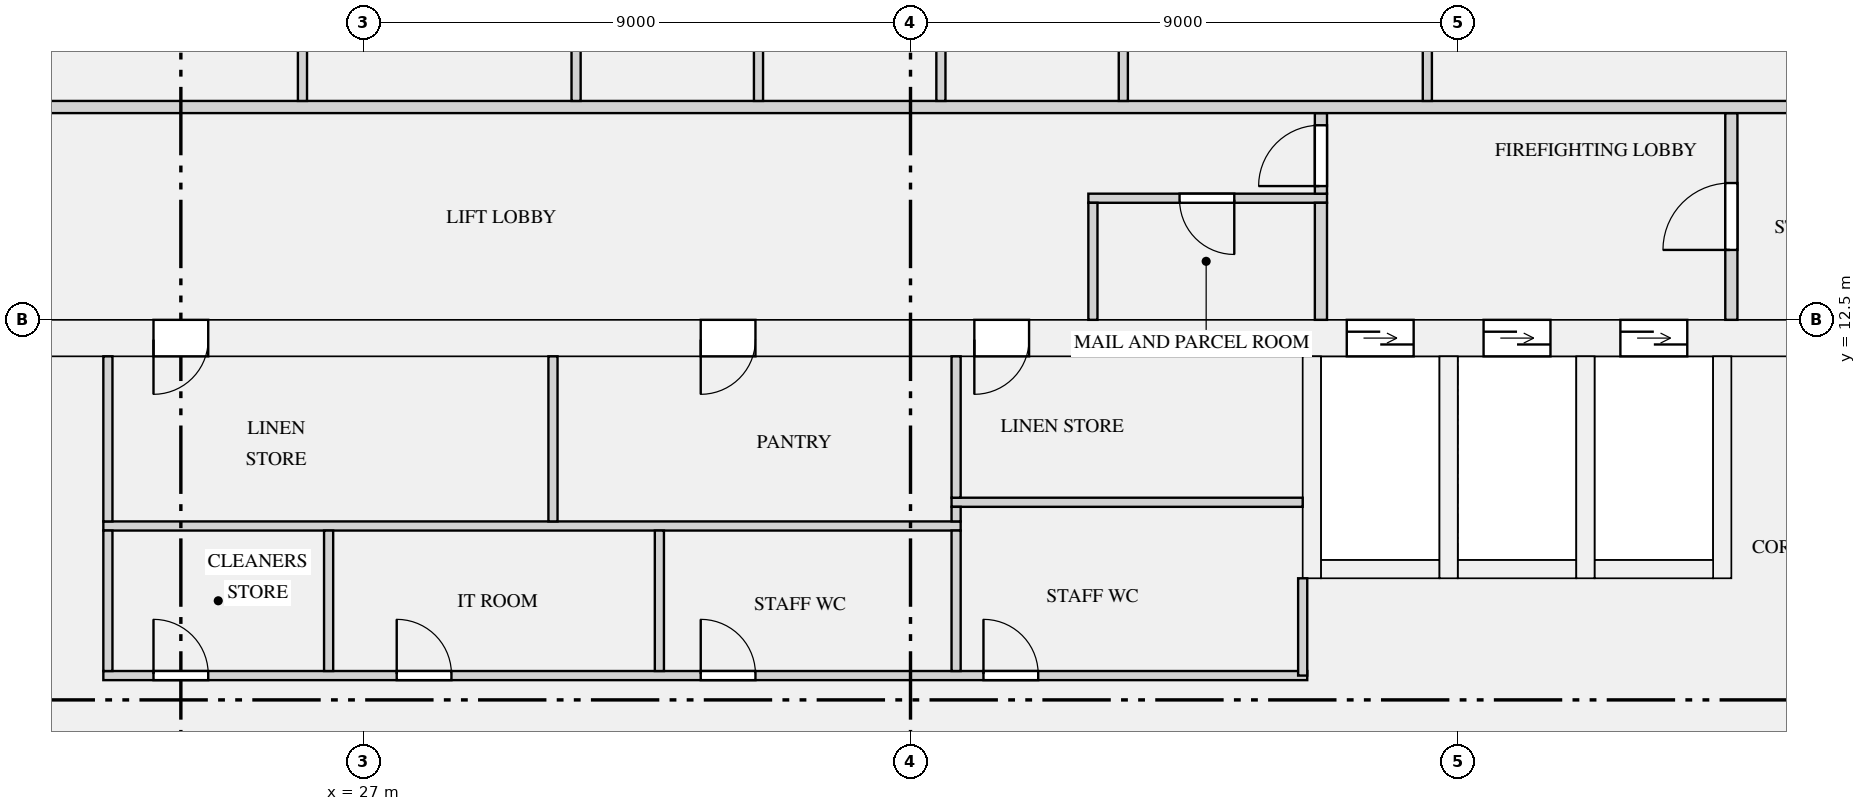
"""IFC4 building model, lengths in metres.
Left out: names, types, materials, properties, quantities, classifications, styles, units other than length and angle.
Written with IfcOpenShell. Run it as: python <this file> out.ifc"""

import sys

from ifc_helpers import new_model, si_unit, direction, frame, frame_2d, origin, place, context, subcontext, project, spatial, rectangle, extrude, element, fill, save


model = new_model("IFC4")
c1 = context("Model", 3, precision=1e-05, world=origin(), true_north=direction((0.0, 1.0)))
c2 = subcontext(c1, "Body", "Model", "MODEL_VIEW")
j1 = project(units=[si_unit("LENGTHUNIT", "METRE"), si_unit("PLANEANGLEUNIT", "RADIAN")], contexts=[c1])
p1 = place(None, origin())
s1 = spatial("IfcSite", under=j1, at=p1, CompositionType="ELEMENT")
p2 = place(p1, origin())
s2 = spatial("IfcBuilding", under=s1, at=p2, CompositionType="ELEMENT")
p3 = place(p2, frame((0.0, 0.0, 102.45)))
s3 = spatial("IfcBuildingStorey", under=s2, at=p3, CompositionType="ELEMENT", Elevation=102.45)
p4 = place(p3, frame((18.8, 12.2, 0.0), z_axis=(0.0, 0.0, 1.0), x_axis=(1.0, 0.0, 0.0)))
e1 = element("IfcWall", 1, at=p4, inside=s3, PredefinedType="SHEAR", context=c2, shape_type="SweptSolid", body=[
    extrude(rectangle(XDim=34.4, YDim=0.6, at=frame_2d((17.2, 0.0))), origin(), (0.0, 0.0, 1.0), 3.15),
])
p5 = place(p4, frame((24.375, 0.0, 0.0)))
e2 = element("IfcOpeningElement", 2, at=p5, cuts=e1, PredefinedType="OPENING", context=c2, shape_type="SweptSolid", body=[
    extrude(rectangle(XDim=1.1, YDim=2.1, at=frame_2d((0.55, 1.05))), frame((0.0, 0.31, 0.0), z_axis=(0.0, -1.0, 0.0), x_axis=(1.0, 0.0, 0.0)), (0.0, 0.0, 1.0), 0.62),
])
p6 = place(p4, frame((26.625, 0.0, 0.0)))
e3 = element("IfcOpeningElement", 3, at=p6, cuts=e1, PredefinedType="OPENING", context=c2, shape_type="SweptSolid", body=[
    extrude(rectangle(XDim=1.1, YDim=2.1, at=frame_2d((0.55, 1.05))), frame((0.0, 0.31, 0.0), z_axis=(0.0, -1.0, 0.0), x_axis=(1.0, 0.0, 0.0)), (0.0, 0.0, 1.0), 0.62),
])
p7 = place(p4, frame((28.875, 0.0, 0.0)))
e4 = element("IfcOpeningElement", 4, at=p7, cuts=e1, PredefinedType="OPENING", context=c2, shape_type="SweptSolid", body=[
    extrude(rectangle(XDim=1.1, YDim=2.1, at=frame_2d((0.55, 1.05))), frame((0.0, 0.31, 0.0), z_axis=(0.0, -1.0, 0.0), x_axis=(1.0, 0.0, 0.0)), (0.0, 0.0, 1.0), 0.62),
])
p8 = place(p4, frame((4.75, 0.0, 0.0)))
e5 = element("IfcOpeningElement", 5, at=p8, cuts=e1, PredefinedType="OPENING", context=c2, shape_type="SweptSolid", body=[
    extrude(rectangle(XDim=0.9, YDim=2.1, at=frame_2d((0.45, 1.05))), frame((0.0, 0.31, 0.0), z_axis=(0.0, -1.0, 0.0), x_axis=(1.0, 0.0, 0.0)), (0.0, 0.0, 1.0), 0.62),
])
p9 = place(p4, frame((13.75, 0.0, 0.0)))
e6 = element("IfcOpeningElement", 6, at=p9, cuts=e1, PredefinedType="OPENING", context=c2, shape_type="SweptSolid", body=[
    extrude(rectangle(XDim=0.9, YDim=2.1, at=frame_2d((0.45, 1.05))), frame((0.0, 0.31, 0.0), z_axis=(0.0, -1.0, 0.0), x_axis=(1.0, 0.0, 0.0)), (0.0, 0.0, 1.0), 0.62),
])
p10 = place(p4, frame((18.25, 0.0, 0.0)))
e7 = element("IfcOpeningElement", 7, at=p10, cuts=e1, PredefinedType="OPENING", context=c2, shape_type="SweptSolid", body=[
    extrude(rectangle(XDim=0.9, YDim=2.1, at=frame_2d((0.45, 1.05))), frame((0.0, 0.31, 0.0), z_axis=(0.0, -1.0, 0.0), x_axis=(1.0, 0.0, 0.0)), (0.0, 0.0, 1.0), 0.62),
])
p11 = place(p4, frame((1.35, 0.0, 0.0)))
e8 = element("IfcOpeningElement", 8, at=p11, cuts=e1, PredefinedType="OPENING", context=c2, shape_type="SweptSolid", body=[
    extrude(rectangle(XDim=1.2, YDim=2.1, at=frame_2d((0.6, 1.05))), frame((0.0, 0.31, 0.0), z_axis=(0.0, -1.0, 0.0), x_axis=(1.0, 0.0, 0.0)), (0.0, 0.0, 1.0), 0.62),
])
p12 = place(p4, frame((31.85, 0.0, 0.0)))
e9 = element("IfcOpeningElement", 9, at=p12, cuts=e1, PredefinedType="OPENING", context=c2, shape_type="SweptSolid", body=[
    extrude(rectangle(XDim=1.2, YDim=2.1, at=frame_2d((0.6, 1.05))), frame((0.0, 0.31, 0.0), z_axis=(0.0, -1.0, 0.0), x_axis=(1.0, 0.0, 0.0)), (0.0, 0.0, 1.0), 0.62),
])
p13 = place(p3, frame((42.75, 8.4, 0.0), z_axis=(0.0, 0.0, 1.0), x_axis=(1.0, 0.0, 0.0)))
e10 = element("IfcWall", 10, at=p13, inside=s3, PredefinedType="SHEAR", context=c2, shape_type="SweptSolid", body=[
    extrude(rectangle(XDim=1.95, YDim=0.3, at=frame_2d((0.975, 0.0))), origin(), (0.0, 0.0, 1.0), 3.15),
])
p14 = place(p3, frame((42.6, 8.25, 0.0), z_axis=(0.0, 0.0, 1.0), x_axis=(0.0, 1.0, 0.0)))
e11 = element("IfcWall", 11, at=p14, inside=s3, PredefinedType="SHEAR", context=c2, shape_type="SweptSolid", body=[
    extrude(rectangle(XDim=3.65, YDim=0.3, at=frame_2d((1.825, 0.0))), origin(), (0.0, 0.0, 1.0), 3.15),
])
p15 = place(p3, frame((45.0, 8.4, 0.0), z_axis=(0.0, 0.0, 1.0), x_axis=(1.0, 0.0, 0.0)))
e12 = element("IfcWall", 12, at=p15, inside=s3, PredefinedType="SHEAR", context=c2, shape_type="SweptSolid", body=[
    extrude(rectangle(XDim=1.95, YDim=0.3, at=frame_2d((0.975, 0.0))), origin(), (0.0, 0.0, 1.0), 3.15),
])
p16 = place(p3, frame((44.85, 8.25, 0.0), z_axis=(0.0, 0.0, 1.0), x_axis=(0.0, 1.0, 0.0)))
e13 = element("IfcWall", 13, at=p16, inside=s3, PredefinedType="SHEAR", context=c2, shape_type="SweptSolid", body=[
    extrude(rectangle(XDim=3.65, YDim=0.3, at=frame_2d((1.825, 0.0))), origin(), (0.0, 0.0, 1.0), 3.15),
])
p17 = place(p3, frame((47.25, 8.4, 0.0), z_axis=(0.0, 0.0, 1.0), x_axis=(1.0, 0.0, 0.0)))
e14 = element("IfcWall", 14, at=p17, inside=s3, PredefinedType="SHEAR", context=c2, shape_type="SweptSolid", body=[
    extrude(rectangle(XDim=1.95, YDim=0.3, at=frame_2d((0.975, 0.0))), origin(), (0.0, 0.0, 1.0), 3.15),
])
for number, where, z_axis, x_axis in (
    (15, (47.1, 8.25, 0.0), (0.0, 0.0, 1.0), (0.0, 1.0, 0.0)),
    (16, (49.35, 8.25, 0.0), (0.0, 0.0, 1.0), (0.0, 1.0, 0.0)),
):
    element("IfcWall", number, at=place(p3, frame(where, z_axis=z_axis, x_axis=x_axis)), inside=s3, PredefinedType="SHEAR", context=c2, shape_type="SweptSolid", body=[
        extrude(rectangle(XDim=3.65, YDim=0.3, at=frame_2d((1.825, 0.0))), origin(), (0.0, 0.0, 1.0), 3.15),
    ])
p18 = place(p3, frame((22.725, 6.65, 0.0), z_axis=(0.0, 0.0, 1.0), x_axis=(1.0, 0.0, 0.0)))
e17 = element("IfcWall", 17, at=p18, inside=s3, PredefinedType="PARTITIONING", context=c2, shape_type="SweptSolid", body=[
    extrude(rectangle(XDim=19.8, YDim=0.15, at=frame_2d((9.9, 0.0))), origin(), (0.0, 0.0, 1.0), 2.83),
])
p19 = place(p18, frame((0.825, 0.0, 0.0)))
e18 = element("IfcOpeningElement", 18, at=p19, cuts=e17, PredefinedType="OPENING", context=c2, shape_type="SweptSolid", body=[
    extrude(rectangle(XDim=0.9, YDim=2.1, at=frame_2d((0.45, 1.05))), frame((0.0, 0.085, 0.0), z_axis=(0.0, -1.0, 0.0), x_axis=(1.0, 0.0, 0.0)), (0.0, 0.0, 1.0), 0.17),
])
p20 = place(p18, frame((4.825, 0.0, 0.0)))
e19 = element("IfcOpeningElement", 19, at=p20, cuts=e17, PredefinedType="OPENING", context=c2, shape_type="SweptSolid", body=[
    extrude(rectangle(XDim=0.9, YDim=2.1, at=frame_2d((0.45, 1.05))), frame((0.0, 0.085, 0.0), z_axis=(0.0, -1.0, 0.0), x_axis=(1.0, 0.0, 0.0)), (0.0, 0.0, 1.0), 0.17),
])
p21 = place(p18, frame((9.825, 0.0, 0.0)))
e20 = element("IfcOpeningElement", 20, at=p21, cuts=e17, PredefinedType="OPENING", context=c2, shape_type="SweptSolid", body=[
    extrude(rectangle(XDim=0.9, YDim=2.1, at=frame_2d((0.45, 1.05))), frame((0.0, 0.085, 0.0), z_axis=(0.0, -1.0, 0.0), x_axis=(1.0, 0.0, 0.0)), (0.0, 0.0, 1.0), 0.17),
])
p22 = place(p18, frame((14.475, 0.0, 0.0)))
e21 = element("IfcOpeningElement", 21, at=p22, cuts=e17, PredefinedType="OPENING", context=c2, shape_type="SweptSolid", body=[
    extrude(rectangle(XDim=0.9, YDim=2.1, at=frame_2d((0.45, 1.05))), frame((0.0, 0.085, 0.0), z_axis=(0.0, -1.0, 0.0), x_axis=(1.0, 0.0, 0.0)), (0.0, 0.0, 1.0), 0.17),
])
p23 = place(p3, frame((22.725, 9.11, 0.0), z_axis=(0.0, 0.0, 1.0), x_axis=(1.0, 0.0, 0.0)))
e22 = element("IfcWall", 22, at=p23, inside=s3, PredefinedType="PARTITIONING", context=c2, shape_type="SweptSolid", body=[
    extrude(rectangle(XDim=14.1, YDim=0.15, at=frame_2d((7.05, 0.0))), origin(), (0.0, 0.0, 1.0), 2.83),
])
p24 = place(p3, frame((36.675, 9.5, 0.0), z_axis=(0.0, 0.0, 1.0), x_axis=(1.0, 0.0, 0.0)))
e23 = element("IfcWall", 23, at=p24, inside=s3, PredefinedType="PARTITIONING", context=c2, shape_type="SweptSolid", body=[
    extrude(rectangle(XDim=5.775, YDim=0.15, at=frame_2d((2.887, 0.0))), origin(), (0.0, 0.0, 1.0), 2.83),
])
p25 = place(p3, frame((38.925, 14.5, 0.0), z_axis=(0.0, 0.0, 1.0), x_axis=(1.0, 0.0, 0.0)))
e24 = element("IfcWall", 24, at=p25, inside=s3, PredefinedType="PARTITIONING", context=c2, shape_type="SweptSolid", body=[
    extrude(rectangle(XDim=3.925, YDim=0.15, at=frame_2d((1.962, 0.0))), origin(), (0.0, 0.0, 1.0), 2.83),
])
p26 = place(p25, frame((1.5, 0.0, 0.0)))
e25 = element("IfcOpeningElement", 25, at=p26, cuts=e24, PredefinedType="OPENING", context=c2, shape_type="SweptSolid", body=[
    extrude(rectangle(XDim=0.9, YDim=2.1, at=frame_2d((0.45, 1.05))), frame((0.0, 0.085, 0.0), z_axis=(0.0, -1.0, 0.0), x_axis=(1.0, 0.0, 0.0)), (0.0, 0.0, 1.0), 0.17),
])
p27 = place(p3, frame((42.45, 6.65, 0.0), z_axis=(0.0, 0.0, 1.0), x_axis=(0.0, 1.0, 0.0)))
e26 = element("IfcWall", 26, at=p27, inside=s3, PredefinedType="PARTITIONING", context=c2, shape_type="SweptSolid", body=[
    extrude(rectangle(XDim=1.6, YDim=0.15, at=frame_2d((0.8, 0.0))), origin(), (0.0, 0.0, 1.0), 2.83),
])
for number, where, z_axis, x_axis in (
    (27, (22.8, 6.725, 0.0), (0.0, 0.0, 1.0), (0.0, 1.0, 0.0)),
    (28, (26.43, 6.725, 0.0), (0.0, 0.0, 1.0), (0.0, 1.0, 0.0)),
    (29, (31.87, 6.725, 0.0), (0.0, 0.0, 1.0), (0.0, 1.0, 0.0)),
    (30, (36.75, 6.725, 0.0), (0.0, 0.0, 1.0), (0.0, 1.0, 0.0)),
):
    element("IfcWall", number, at=place(p3, frame(where, z_axis=z_axis, x_axis=x_axis)), inside=s3, PredefinedType="PARTITIONING", context=c2, shape_type="SweptSolid", body=[
        extrude(rectangle(XDim=2.31, YDim=0.15, at=frame_2d((1.155, 0.0))), origin(), (0.0, 0.0, 1.0), 2.83),
    ])
for number, where, z_axis, x_axis in (
    (31, (22.8, 9.185, 0.0), (0.0, 0.0, 1.0), (0.0, 1.0, 0.0)),
    (32, (30.12, 9.185, 0.0), (0.0, 0.0, 1.0), (0.0, 1.0, 0.0)),
):
    element("IfcWall", number, at=place(p3, frame(where, z_axis=z_axis, x_axis=x_axis)), inside=s3, PredefinedType="PARTITIONING", context=c2, shape_type="SweptSolid", body=[
        extrude(rectangle(XDim=2.715, YDim=0.15, at=frame_2d((1.357, 0.0))), origin(), (0.0, 0.0, 1.0), 2.83),
    ])
p28 = place(p3, frame((36.75, 9.185, 0.0), z_axis=(0.0, 0.0, 1.0), x_axis=(0.0, 1.0, 0.0)))
e33 = element("IfcWall", 33, at=p28, inside=s3, PredefinedType="PARTITIONING", context=c2, shape_type="SweptSolid", body=[
    extrude(rectangle(XDim=0.24, YDim=0.15, at=frame_2d((0.12, 0.0))), origin(), (0.0, 0.0, 1.0), 2.83),
])
p29 = place(p3, frame((36.75, 9.575, 0.0), z_axis=(0.0, 0.0, 1.0), x_axis=(0.0, 1.0, 0.0)))
e34 = element("IfcWall", 34, at=p29, inside=s3, PredefinedType="PARTITIONING", context=c2, shape_type="SweptSolid", body=[
    extrude(rectangle(XDim=2.325, YDim=0.15, at=frame_2d((1.163, 0.0))), origin(), (0.0, 0.0, 1.0), 2.83),
])
p30 = place(p3, frame((39.0, 12.5, 0.0), z_axis=(0.0, 0.0, 1.0), x_axis=(0.0, 1.0, 0.0)))
e35 = element("IfcWall", 35, at=p30, inside=s3, PredefinedType="PARTITIONING", context=c2, shape_type="SweptSolid", body=[
    extrude(rectangle(XDim=1.925, YDim=0.15, at=frame_2d((0.962, 0.0))), origin(), (0.0, 0.0, 1.0), 2.83),
])
p31 = place(p3, frame((42.75, 12.5, 0.0), z_axis=(0.0, 0.0, 1.0), x_axis=(0.0, 1.0, 0.0)))
e36 = element("IfcWall", 36, at=p31, inside=s3, PredefinedType="PARTITIONING", context=c2, shape_type="SweptSolid", body=[
    extrude(rectangle(XDim=1.925, YDim=0.2, at=frame_2d((0.962, 0.0))), origin(), (0.0, 0.0, 1.0), 2.83),
])
p32 = place(p3, frame((49.5, 12.5, 0.0), z_axis=(0.0, 0.0, 1.0), x_axis=(0.0, 1.0, 0.0)))
e37 = element("IfcWall", 37, at=p32, inside=s3, PredefinedType="PARTITIONING", context=c2, shape_type="SweptSolid", body=[
    extrude(rectangle(XDim=3.4, YDim=0.2, at=frame_2d((1.7, 0.0))), origin(), (0.0, 0.0, 1.0), 2.83),
])
p33 = place(p32, frame((1.15, 0.0, 0.0)))
e38 = element("IfcOpeningElement", 38, at=p33, cuts=e37, PredefinedType="OPENING", context=c2, shape_type="SweptSolid", body=[
    extrude(rectangle(XDim=1.1, YDim=2.1, at=frame_2d((0.55, 1.05))), frame((0.0, 0.11, 0.0), z_axis=(0.0, -1.0, 0.0), x_axis=(1.0, 0.0, 0.0)), (0.0, 0.0, 1.0), 0.22),
])
p34 = place(p3, frame((42.75, 14.575, 0.0), z_axis=(0.0, 0.0, 1.0), x_axis=(0.0, 1.0, 0.0)))
e39 = element("IfcWall", 39, at=p34, inside=s3, PredefinedType="PARTITIONING", context=c2, shape_type="SweptSolid", body=[
    extrude(rectangle(XDim=1.325, YDim=0.2, at=frame_2d((0.663, 0.0))), origin(), (0.0, 0.0, 1.0), 2.83),
])
p35 = place(p34, frame((0.125, 0.0, 0.0)))
e40 = element("IfcOpeningElement", 40, at=p35, cuts=e39, PredefinedType="OPENING", context=c2, shape_type="SweptSolid", body=[
    extrude(rectangle(XDim=1.0, YDim=2.1, at=frame_2d((0.5, 1.05))), frame((0.0, 0.11, 0.0), z_axis=(0.0, -1.0, 0.0), x_axis=(1.0, 0.0, 0.0)), (0.0, 0.0, 1.0), 0.22),
])
p36 = place(p3, frame((17.9, 16.0, 0.0), z_axis=(0.0, 0.0, 1.0), x_axis=(1.0, 0.0, 0.0)))
e41 = element("IfcWall", 41, at=p36, inside=s3, PredefinedType="PARTITIONING", context=c2, shape_type="SweptSolid", body=[
    extrude(rectangle(XDim=36.2, YDim=0.2, at=frame_2d((18.1, 0.0))), origin(), (0.0, 0.0, 1.0), 2.83),
])
p37 = place(p36, frame((0.9, 0.0, 0.0)))
e42 = element("IfcOpeningElement", 42, at=p37, cuts=e41, PredefinedType="OPENING", context=c2, shape_type="SweptSolid", body=[
    extrude(rectangle(XDim=1.4, YDim=2.1, at=frame_2d((0.7, 1.05))), frame((0.0, 0.11, 0.0), z_axis=(0.0, -1.0, 0.0), x_axis=(1.0, 0.0, 0.0)), (0.0, 0.0, 1.0), 0.22),
])
p38 = place(p36, frame((33.9, 0.0, 0.0)))
e43 = element("IfcOpeningElement", 43, at=p38, cuts=e41, PredefinedType="OPENING", context=c2, shape_type="SweptSolid", body=[
    extrude(rectangle(XDim=1.4, YDim=2.1, at=frame_2d((0.7, 1.05))), frame((0.0, 0.11, 0.0), z_axis=(0.0, -1.0, 0.0), x_axis=(1.0, 0.0, 0.0)), (0.0, 0.0, 1.0), 0.22),
])
for number, where, z_axis, x_axis in (
    (44, (26.0, 16.1, 0.0), (0.0, 0.0, 1.0), (0.0, 1.0, 0.0)),
    (45, (30.5, 16.1, 0.0), (0.0, 0.0, 1.0), (0.0, 1.0, 0.0)),
    (46, (33.5, 16.1, 0.0), (0.0, 0.0, 1.0), (0.0, 1.0, 0.0)),
    (47, (36.5, 16.1, 0.0), (0.0, 0.0, 1.0), (0.0, 1.0, 0.0)),
    (48, (39.5, 16.1, 0.0), (0.0, 0.0, 1.0), (0.0, 1.0, 0.0)),
    (49, (44.5, 16.1, 0.0), (0.0, 0.0, 1.0), (0.0, 1.0, 0.0)),
):
    element("IfcWall", number, at=place(p3, frame(where, z_axis=z_axis, x_axis=x_axis)), inside=s3, PredefinedType="PARTITIONING", context=c2, shape_type="SweptSolid", body=[
        extrude(rectangle(XDim=4.825, YDim=0.15, at=frame_2d((2.413, 0.0))), origin(), (0.0, 0.0, 1.0), 2.83),
    ])
p39 = place(p5, origin())
e50 = element("IfcDoor", 50, at=p39, inside=s3, OperationType="DOUBLE_DOOR_SLIDING", PredefinedType="DOOR", context=c2, shape_type="SweptSolid", body=[
    extrude(rectangle(XDim=1.1, YDim=2.1, at=frame_2d((0.55, 1.05))), frame((0.0, 0.025, 0.0), z_axis=(0.0, -1.0, 0.0), x_axis=(1.0, 0.0, 0.0)), (0.0, 0.0, 1.0), 0.05),
])
fill(e2, e50)
p40 = place(p6, origin())
e51 = element("IfcDoor", 51, at=p40, inside=s3, OperationType="DOUBLE_DOOR_SLIDING", PredefinedType="DOOR", context=c2, shape_type="SweptSolid", body=[
    extrude(rectangle(XDim=1.1, YDim=2.1, at=frame_2d((0.55, 1.05))), frame((0.0, 0.025, 0.0), z_axis=(0.0, -1.0, 0.0), x_axis=(1.0, 0.0, 0.0)), (0.0, 0.0, 1.0), 0.05),
])
fill(e3, e51)
p41 = place(p7, origin())
e52 = element("IfcDoor", 52, at=p41, inside=s3, OperationType="DOUBLE_DOOR_SLIDING", PredefinedType="DOOR", context=c2, shape_type="SweptSolid", body=[
    extrude(rectangle(XDim=1.1, YDim=2.1, at=frame_2d((0.55, 1.05))), frame((0.0, 0.025, 0.0), z_axis=(0.0, -1.0, 0.0), x_axis=(1.0, 0.0, 0.0)), (0.0, 0.0, 1.0), 0.05),
])
fill(e4, e52)
p42 = place(p26, frame((0.9, 0.0, 0.0), z_axis=(0.0, 0.0, 1.0), x_axis=(-1.0, 0.0, 0.0)))
e53 = element("IfcDoor", 53, at=p42, inside=s3, OperationType="SINGLE_SWING_LEFT", PredefinedType="DOOR", context=c2, shape_type="SweptSolid", body=[
    extrude(rectangle(XDim=0.9, YDim=2.1, at=frame_2d((0.45, 1.05))), frame((0.0, 0.025, 0.0), z_axis=(0.0, -1.0, 0.0), x_axis=(1.0, 0.0, 0.0)), (0.0, 0.0, 1.0), 0.05),
])
fill(e25, e53)
p43 = place(p19, origin())
e54 = element("IfcDoor", 54, at=p43, inside=s3, OperationType="SINGLE_SWING_LEFT", PredefinedType="DOOR", context=c2, shape_type="SweptSolid", body=[
    extrude(rectangle(XDim=0.9, YDim=2.1, at=frame_2d((0.45, 1.05))), frame((0.0, 0.025, 0.0), z_axis=(0.0, -1.0, 0.0), x_axis=(1.0, 0.0, 0.0)), (0.0, 0.0, 1.0), 0.05),
])
fill(e18, e54)
p44 = place(p20, origin())
e55 = element("IfcDoor", 55, at=p44, inside=s3, OperationType="SINGLE_SWING_LEFT", PredefinedType="DOOR", context=c2, shape_type="SweptSolid", body=[
    extrude(rectangle(XDim=0.9, YDim=2.1, at=frame_2d((0.45, 1.05))), frame((0.0, 0.025, 0.0), z_axis=(0.0, -1.0, 0.0), x_axis=(1.0, 0.0, 0.0)), (0.0, 0.0, 1.0), 0.05),
])
fill(e19, e55)
p45 = place(p21, origin())
e56 = element("IfcDoor", 56, at=p45, inside=s3, OperationType="SINGLE_SWING_LEFT", PredefinedType="DOOR", context=c2, shape_type="SweptSolid", body=[
    extrude(rectangle(XDim=0.9, YDim=2.1, at=frame_2d((0.45, 1.05))), frame((0.0, 0.025, 0.0), z_axis=(0.0, -1.0, 0.0), x_axis=(1.0, 0.0, 0.0)), (0.0, 0.0, 1.0), 0.05),
])
fill(e20, e56)
p46 = place(p8, frame((0.9, 0.0, 0.0), z_axis=(0.0, 0.0, 1.0), x_axis=(-1.0, 0.0, 0.0)))
e57 = element("IfcDoor", 57, at=p46, inside=s3, OperationType="SINGLE_SWING_RIGHT", PredefinedType="DOOR", context=c2, shape_type="SweptSolid", body=[
    extrude(rectangle(XDim=0.9, YDim=2.1, at=frame_2d((0.45, 1.05))), frame((0.0, 0.025, 0.0), z_axis=(0.0, -1.0, 0.0), x_axis=(1.0, 0.0, 0.0)), (0.0, 0.0, 1.0), 0.05),
])
fill(e5, e57)
p47 = place(p9, frame((0.9, 0.0, 0.0), z_axis=(0.0, 0.0, 1.0), x_axis=(-1.0, 0.0, 0.0)))
e58 = element("IfcDoor", 58, at=p47, inside=s3, OperationType="SINGLE_SWING_RIGHT", PredefinedType="DOOR", context=c2, shape_type="SweptSolid", body=[
    extrude(rectangle(XDim=0.9, YDim=2.1, at=frame_2d((0.45, 1.05))), frame((0.0, 0.025, 0.0), z_axis=(0.0, -1.0, 0.0), x_axis=(1.0, 0.0, 0.0)), (0.0, 0.0, 1.0), 0.05),
])
fill(e6, e58)
p48 = place(p22, origin())
e59 = element("IfcDoor", 59, at=p48, inside=s3, OperationType="SINGLE_SWING_LEFT", PredefinedType="DOOR", context=c2, shape_type="SweptSolid", body=[
    extrude(rectangle(XDim=0.9, YDim=2.1, at=frame_2d((0.45, 1.05))), frame((0.0, 0.025, 0.0), z_axis=(0.0, -1.0, 0.0), x_axis=(1.0, 0.0, 0.0)), (0.0, 0.0, 1.0), 0.05),
])
fill(e21, e59)
p49 = place(p10, frame((0.9, 0.0, 0.0), z_axis=(0.0, 0.0, 1.0), x_axis=(-1.0, 0.0, 0.0)))
e60 = element("IfcDoor", 60, at=p49, inside=s3, OperationType="SINGLE_SWING_RIGHT", PredefinedType="DOOR", context=c2, shape_type="SweptSolid", body=[
    extrude(rectangle(XDim=0.9, YDim=2.1, at=frame_2d((0.45, 1.05))), frame((0.0, 0.025, 0.0), z_axis=(0.0, -1.0, 0.0), x_axis=(1.0, 0.0, 0.0)), (0.0, 0.0, 1.0), 0.05),
])
fill(e7, e60)
p50 = place(p35, origin())
e61 = element("IfcDoor", 61, at=p50, inside=s3, OperationType="SINGLE_SWING_LEFT", PredefinedType="DOOR", context=c2, shape_type="SweptSolid", body=[
    extrude(rectangle(XDim=1.0, YDim=2.1, at=frame_2d((0.5, 1.05))), frame((0.0, 0.025, 0.0), z_axis=(0.0, -1.0, 0.0), x_axis=(1.0, 0.0, 0.0)), (0.0, 0.0, 1.0), 0.05),
])
fill(e40, e61)
p51 = place(p33, origin())
e62 = element("IfcDoor", 62, at=p51, inside=s3, OperationType="SINGLE_SWING_LEFT", PredefinedType="DOOR", context=c2, shape_type="SweptSolid", body=[
    extrude(rectangle(XDim=1.1, YDim=2.1, at=frame_2d((0.55, 1.05))), frame((0.0, 0.025, 0.0), z_axis=(0.0, -1.0, 0.0), x_axis=(1.0, 0.0, 0.0)), (0.0, 0.0, 1.0), 0.05),
])
fill(e38, e62)
save(model, sys.argv[1])
